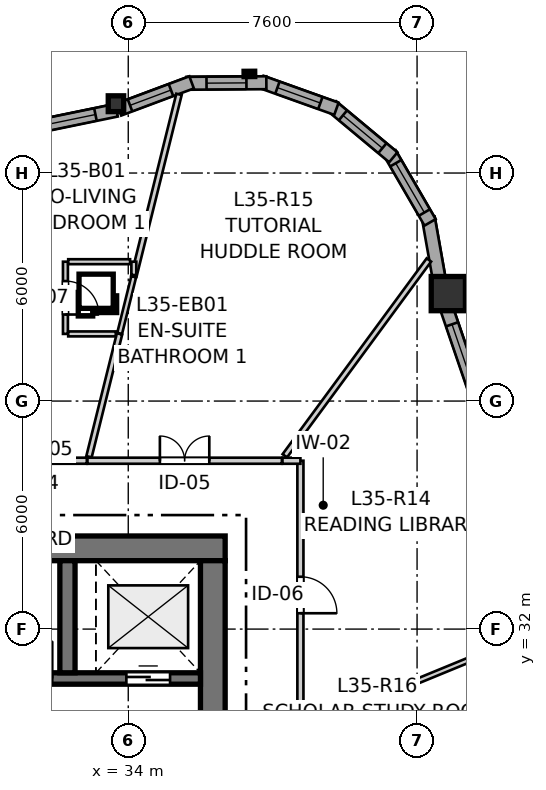
"""IFC4 building model, lengths in metres.
Left out: names, types, materials, properties, quantities, classifications, styles, units other than length and angle.
Written with IfcOpenShell. Run it as: python <this file> out.ifc"""

import sys

from ifc_helpers import new_model, si_unit, direction, frame, frame_2d, origin, origin_2d, place, context, subcontext, project, spatial, rectangle, i_section, extrude, source, transform, mapped, element, fill, save


model = new_model("IFC4")
c1 = context("Model", 3, precision=1e-05, world=origin(), true_north=direction((0.0, 1.0)))
c2 = subcontext(c1, "Body", "Model", "MODEL_VIEW")
j1 = project(units=[si_unit("LENGTHUNIT", "METRE"), si_unit("PLANEANGLEUNIT", "RADIAN")], contexts=[c1])
p1 = place(None, origin())
s1 = spatial("IfcSite", under=j1, at=p1, CompositionType="ELEMENT")
p2 = place(p1, origin())
s2 = spatial("IfcBuilding", under=s1, at=p2, CompositionType="ELEMENT")
p3 = place(p2, frame((0.0, 0.0, 118.4)))
s3 = spatial("IfcBuildingStorey", under=s2, at=p3, CompositionType="ELEMENT", Elevation=118.4)
p4 = place(p3, frame((36.55, 34.125, 0.0), z_axis=(0.0, 0.0, 1.0), x_axis=(-1.0, 0.0, 0.0)))
e1 = element("IfcWall", 1, at=p4, inside=s3, PredefinedType="SHEAR", context=c2, shape_type="SweptSolid", body=[
    extrude(rectangle(XDim=12.4, YDim=0.65, at=frame_2d((6.2, 0.0))), origin(), (0.0, 0.0, 1.0), 2.95),
])
p5 = place(p3, frame((36.225, 18.2, 0.0), z_axis=(0.0, 0.0, 1.0), x_axis=(0.0, 1.0, 0.0)))
e2 = element("IfcWall", 2, at=p5, inside=s3, PredefinedType="SHEAR", context=c2, shape_type="SweptSolid", body=[
    extrude(rectangle(XDim=15.6, YDim=0.65, at=frame_2d((7.8, 0.0))), origin(), (0.0, 0.0, 1.0), 2.95),
])
p6 = place(p5, frame((4.25, 0.0, 0.0)))
e3 = element("IfcOpeningElement", 3, at=p6, cuts=e2, PredefinedType="OPENING", context=c2, shape_type="SweptSolid", body=[
    extrude(rectangle(XDim=1.1, YDim=2.15, at=frame_2d((0.55, 1.075))), frame((0.0, 0.335, 0.0), z_axis=(0.0, -1.0, 0.0), x_axis=(1.0, 0.0, 0.0)), (0.0, 0.0, 1.0), 0.67),
])
p7 = place(p5, frame((10.25, 0.0, 0.0)))
e4 = element("IfcOpeningElement", 4, at=p7, cuts=e2, PredefinedType="OPENING", context=c2, shape_type="SweptSolid", body=[
    extrude(rectangle(XDim=1.1, YDim=2.15, at=frame_2d((0.55, 1.075))), frame((0.0, 0.335, 0.0), z_axis=(0.0, -1.0, 0.0), x_axis=(1.0, 0.0, 0.0)), (0.0, 0.0, 1.0), 0.67),
])
p8 = place(p3, frame((24.8, 30.7, 0.0), z_axis=(0.0, 0.0, 1.0), x_axis=(1.0, 0.0, 0.0)))
e5 = element("IfcWall", 5, at=p8, inside=s3, PredefinedType="SHEAR", context=c2, shape_type="SweptSolid", body=[
    extrude(rectangle(XDim=11.1, YDim=0.3, at=frame_2d((5.55, 0.0))), origin(), (0.0, 0.0, 1.0), 2.95),
])
p9 = place(p8, frame((6.22, 0.0, 0.0)))
e6 = element("IfcOpeningElement", 6, at=p9, cuts=e5, PredefinedType="OPENING", context=c2, shape_type="SweptSolid", body=[
    extrude(rectangle(XDim=0.98, YDim=2.15, at=frame_2d((0.49, 1.075))), frame((0.0, 0.16, 0.0), z_axis=(0.0, -1.0, 0.0), x_axis=(1.0, 0.0, 0.0)), (0.0, 0.0, 1.0), 0.32),
])
p10 = place(p8, frame((9.15, 0.0, 0.0)))
e7 = element("IfcOpeningElement", 7, at=p10, cuts=e5, PredefinedType="OPENING", context=c2, shape_type="SweptSolid", body=[
    extrude(rectangle(XDim=1.15, YDim=2.15, at=frame_2d((0.575, 1.075))), frame((0.0, 0.16, 0.0), z_axis=(0.0, -1.0, 0.0), x_axis=(1.0, 0.0, 0.0)), (0.0, 0.0, 1.0), 0.32),
])
p11 = place(p3, frame((32.4, 30.85, 0.0), z_axis=(0.0, 0.0, 1.0), x_axis=(0.0, 1.0, 0.0)))
e8 = element("IfcWall", 8, at=p11, inside=s3, PredefinedType="SHEAR", context=c2, shape_type="SweptSolid", body=[
    extrude(rectangle(XDim=2.95, YDim=0.4, at=frame_2d((1.475, 0.0))), origin(), (0.0, 0.0, 1.0), 2.95),
])
m1 = source(origin(), c2, "Body", "SweptSolid", [
    extrude(rectangle(XDim=0.9, YDim=0.9, at=origin_2d()), origin(), (0.0, 0.0, 1.0), 2.95),
])
p12 = place(p3, frame((42.423, 40.828, 0.0), z_axis=(0.0, 0.0, 1.0), x_axis=(1.0, 0.0, 0.0)))
e9 = element("IfcColumn", 9, at=p12, inside=s3, PredefinedType="COLUMN", context=c2, shape_type="MappedRepresentation", body=[
    mapped(m1, transform((0.0, 0.0, 0.0), x_axis=(1.0, 0.0, 0.0), y_axis=(0.0, 1.0, 0.0), z_axis=(0.0, 0.0, 1.0), scale=1.0)),
])
m2 = source(origin(), c2, "Body", "SweptSolid", [
    extrude(i_section(OverallWidth=0.406, OverallDepth=0.416, WebThickness=0.027, FlangeThickness=0.044, FilletRadius=0.015, at=origin_2d()), origin(), (0.0, 0.0, 1.0), 2.95),
])
p13 = place(p3, frame((33.677, 45.824, 0.0), z_axis=(0.0, 0.0, 1.0), x_axis=(1.0, 0.0, 0.0)))
e10 = element("IfcColumn", 10, at=p13, inside=s3, PredefinedType="PILASTER", context=c2, shape_type="MappedRepresentation", body=[
    mapped(m2, transform((0.0, 0.0, 0.0), x_axis=(1.0, 0.0, 0.0), y_axis=(0.0, 1.0, 0.0), z_axis=(0.0, 0.0, 1.0), scale=1.0)),
])
p14 = place(p3, frame((43.288, 37.771, 0.0), z_axis=(0.0, 0.0, 1.0), x_axis=(-0.323537149191, 0.94621546864, 0.0)))
e11 = element("IfcWall", 11, at=p14, inside=s3, PredefinedType="SOLIDWALL", context=c2, shape_type="SweptSolid", body=[
    extrude(rectangle(XDim=2.942, YDim=0.34, at=frame_2d((1.471, 0.0))), origin(), (0.0, 0.0, 1.0), 2.48),
])
p15 = place(p14, frame((0.576, 0.0, 0.82)))
e12 = element("IfcOpeningElement", 12, at=p15, cuts=e11, PredefinedType="OPENING", context=c2, shape_type="SweptSolid", body=[
    extrude(rectangle(XDim=1.8, YDim=1.45, at=frame_2d((0.9, 0.725))), frame((0.0, 0.18, 0.0), z_axis=(0.0, -1.0, 0.0), x_axis=(1.0, 0.0, 0.0)), (0.0, 0.0, 1.0), 0.36),
])
p16 = place(p3, frame((42.215, 41.024, 0.0), z_axis=(0.0, 0.0, 1.0), x_axis=(-0.17440141227, 0.984674640375, 0.0)))
e13 = element("IfcWall", 13, at=p16, inside=s3, PredefinedType="SOLIDWALL", context=c2, shape_type="SweptSolid", body=[
    extrude(rectangle(XDim=1.831, YDim=0.34, at=frame_2d((0.916, 0.0))), origin(), (0.0, 0.0, 1.0), 2.48),
])
p17 = place(p3, frame((41.942, 42.701, 0.0), z_axis=(0.0, 0.0, 1.0), x_axis=(-0.501902596059, 0.864924149315, 0.0)))
e14 = element("IfcWall", 14, at=p17, inside=s3, PredefinedType="SOLIDWALL", context=c2, shape_type="SweptSolid", body=[
    extrude(rectangle(XDim=2.099, YDim=0.34, at=frame_2d((1.049, 0.0))), origin(), (0.0, 0.0, 1.0), 2.48),
])
p18 = place(p17, frame((0.3, 0.0, 0.82)))
e15 = element("IfcOpeningElement", 15, at=p18, cuts=e14, PredefinedType="OPENING", context=c2, shape_type="SweptSolid", body=[
    extrude(rectangle(XDim=1.5, YDim=1.45, at=frame_2d((0.75, 0.725))), frame((0.0, 0.18, 0.0), z_axis=(0.0, -1.0, 0.0), x_axis=(1.0, 0.0, 0.0)), (0.0, 0.0, 1.0), 0.36),
])
p19 = place(p3, frame((40.975, 44.414, 0.0), z_axis=(0.0, 0.0, 1.0), x_axis=(-0.768440501876, 0.639921241308, 0.0)))
e16 = element("IfcWall", 16, at=p19, inside=s3, PredefinedType="SOLIDWALL", context=c2, shape_type="SweptSolid", body=[
    extrude(rectangle(XDim=2.099, YDim=0.34, at=frame_2d((1.05, 0.0))), origin(), (0.0, 0.0, 1.0), 2.48),
])
p20 = place(p19, frame((0.375, 0.0, 0.82)))
e17 = element("IfcOpeningElement", 17, at=p20, cuts=e16, PredefinedType="OPENING", context=c2, shape_type="SweptSolid", body=[
    extrude(rectangle(XDim=1.35, YDim=1.45, at=frame_2d((0.675, 0.725))), frame((0.0, 0.18, 0.0), z_axis=(0.0, -1.0, 0.0), x_axis=(1.0, 0.0, 0.0)), (0.0, 0.0, 1.0), 0.36),
])
p21 = place(p3, frame((39.478, 45.691, 0.0), z_axis=(0.0, 0.0, 1.0), x_axis=(-0.941523304278, 0.336947870598, 0.0)))
e18 = element("IfcWall", 18, at=p21, inside=s3, PredefinedType="SOLIDWALL", context=c2, shape_type="SweptSolid", body=[
    extrude(rectangle(XDim=2.099, YDim=0.34, at=frame_2d((1.05, 0.0))), origin(), (0.0, 0.0, 1.0), 2.48),
])
p22 = place(p21, frame((0.449, 0.0, 0.82)))
e19 = element("IfcOpeningElement", 19, at=p22, cuts=e18, PredefinedType="OPENING", context=c2, shape_type="SweptSolid", body=[
    extrude(rectangle(XDim=1.2, YDim=1.45, at=frame_2d((0.6, 0.725))), frame((0.0, 0.18, 0.0), z_axis=(0.0, -1.0, 0.0), x_axis=(1.0, 0.0, 0.0)), (0.0, 0.0, 1.0), 0.36),
])
p23 = place(p3, frame((37.634, 46.376, 0.0), z_axis=(0.0, 0.0, 1.0), x_axis=(-0.999976456891, -0.00686189939, 0.0)))
e20 = element("IfcWall", 20, at=p23, inside=s3, PredefinedType="SOLIDWALL", context=c2, shape_type="SweptSolid", body=[
    extrude(rectangle(XDim=2.099, YDim=0.34, at=frame_2d((1.05, 0.0))), origin(), (0.0, 0.0, 1.0), 2.48),
])
p24 = place(p23, frame((0.524, 0.0, 0.82)))
e21 = element("IfcOpeningElement", 21, at=p24, cuts=e20, PredefinedType="OPENING", context=c2, shape_type="SweptSolid", body=[
    extrude(rectangle(XDim=1.05, YDim=1.45, at=frame_2d((0.525, 0.725))), frame((0.0, 0.18, 0.0), z_axis=(0.0, -1.0, 0.0), x_axis=(1.0, 0.0, 0.0)), (0.0, 0.0, 1.0), 0.36),
])
p25 = place(p3, frame((35.667, 46.386, 0.0), z_axis=(0.0, 0.0, 1.0), x_axis=(-0.936761017964, -0.34996970615, 0.0)))
e22 = element("IfcWall", 22, at=p25, inside=s3, PredefinedType="SOLIDWALL", context=c2, shape_type="SweptSolid", body=[
    extrude(rectangle(XDim=2.041, YDim=0.34, at=frame_2d((1.021, 0.0))), origin(), (0.0, 0.0, 1.0), 2.48),
])
p26 = place(p25, frame((0.579, 0.0, 0.82)))
e23 = element("IfcOpeningElement", 23, at=p26, cuts=e22, PredefinedType="OPENING", context=c2, shape_type="SweptSolid", body=[
    extrude(rectangle(XDim=1.15, YDim=1.2, at=frame_2d((0.575, 0.6))), frame((0.0, 0.18, 0.0), z_axis=(0.0, -1.0, 0.0), x_axis=(1.0, 0.0, 0.0)), (0.0, 0.0, 1.0), 0.36),
])
p27 = place(p3, frame((33.691, 45.653, 0.0), z_axis=(0.0, 0.0, 1.0), x_axis=(-0.979414063846, -0.201861565287, 0.0)))
e24 = element("IfcWall", 24, at=p27, inside=s3, PredefinedType="SOLIDWALL", context=c2, shape_type="SweptSolid", body=[
    extrude(rectangle(XDim=3.104, YDim=0.34, at=frame_2d((1.552, 0.0))), origin(), (0.0, 0.0, 1.0), 2.48),
])
p28 = place(p27, frame((0.567, 0.0, 0.82)))
e25 = element("IfcOpeningElement", 25, at=p28, cuts=e24, PredefinedType="OPENING", context=c2, shape_type="SweptSolid", body=[
    extrude(rectangle(XDim=1.95, YDim=1.4, at=frame_2d((0.975, 0.7))), frame((0.0, 0.18, 0.0), z_axis=(0.0, -1.0, 0.0), x_axis=(1.0, 0.0, 0.0)), (0.0, 0.0, 1.0), 0.36),
])
p29 = place(p3, frame((38.53, 36.43, 0.0), z_axis=(0.0, 0.0, 1.0), x_axis=(0.0, -1.0, 0.0)))
e26 = element("IfcWall", 26, at=p29, inside=s3, PredefinedType="PARTITIONING", context=c2, shape_type="SweptSolid", body=[
    extrude(rectangle(XDim=7.083, YDim=0.16, at=frame_2d((3.542, 0.0))), origin(), (0.0, 0.0, 1.0), 2.588),
])
p30 = place(p29, frame((3.053, 0.0, 0.0)))
e27 = element("IfcOpeningElement", 27, at=p30, cuts=e26, PredefinedType="OPENING", context=c2, shape_type="SweptSolid", body=[
    extrude(rectangle(XDim=0.96, YDim=2.1, at=frame_2d((0.48, 1.05))), frame((0.0, 0.09, 0.0), z_axis=(0.0, -1.0, 0.0), x_axis=(1.0, 0.0, 0.0)), (0.0, 0.0, 1.0), 0.18),
])
p31 = place(p3, frame((32.925, 36.43, 0.0), z_axis=(0.0, 0.0, 1.0), x_axis=(1.0, 0.0, 0.0)))
e28 = element("IfcWall", 28, at=p31, inside=s3, PredefinedType="PARTITIONING", context=c2, shape_type="SweptSolid", body=[
    extrude(rectangle(XDim=5.118, YDim=0.16, at=frame_2d((2.559, 0.0))), origin(), (0.0, 0.0, 1.0), 2.588),
])
p32 = place(p31, frame((1.907, 0.0, 0.0)))
e29 = element("IfcOpeningElement", 29, at=p32, cuts=e28, PredefinedType="OPENING", context=c2, shape_type="SweptSolid", body=[
    extrude(rectangle(XDim=1.3, YDim=2.1, at=frame_2d((0.65, 1.05))), frame((0.0, 0.09, 0.0), z_axis=(0.0, -1.0, 0.0), x_axis=(1.0, 0.0, 0.0)), (0.0, 0.0, 1.0), 0.18),
])
p33 = place(p3, frame((30.063, 36.43, 0.0), z_axis=(0.0, 0.0, 1.0), x_axis=(1.0, 0.0, 0.0)))
e30 = element("IfcWall", 30, at=p33, inside=s3, PredefinedType="PARTITIONING", context=c2, shape_type="SweptSolid", body=[
    extrude(rectangle(XDim=2.847, YDim=0.16, at=frame_2d((1.423, 0.0))), origin(), (0.0, 0.0, 1.0), 2.95),
])
p34 = place(p33, frame((0.964, 0.0, 0.0)))
e31 = element("IfcOpeningElement", 31, at=p34, cuts=e30, PredefinedType="OPENING", context=c2, shape_type="SweptSolid", body=[
    extrude(rectangle(XDim=0.92, YDim=2.1, at=frame_2d((0.46, 1.05))), frame((0.0, 0.09, 0.0), z_axis=(0.0, -1.0, 0.0), x_axis=(1.0, 0.0, 0.0)), (0.0, 0.0, 1.0), 0.18),
])
p35 = place(p3, frame((32.347, 41.667, 0.0), z_axis=(0.0, 0.0, 1.0), x_axis=(0.0, -1.0, 0.0)))
e32 = element("IfcWall", 32, at=p35, inside=s3, PredefinedType="PARTITIONING", context=c2, shape_type="SweptSolid", body=[
    extrude(rectangle(XDim=1.9, YDim=0.13, at=frame_2d((0.95, 0.0))), origin(), (0.0, 0.0, 1.0), 2.95),
])
p36 = place(p35, frame((0.51, 0.0, 0.0)))
e33 = element("IfcOpeningElement", 33, at=p36, cuts=e32, PredefinedType="OPENING", context=c2, shape_type="SweptSolid", body=[
    extrude(rectangle(XDim=0.88, YDim=2.05, at=frame_2d((0.44, 1.025))), frame((0.0, 0.075, 0.0), z_axis=(0.0, -1.0, 0.0), x_axis=(1.0, 0.0, 0.0)), (0.0, 0.0, 1.0), 0.15),
])
p37 = place(p3, frame((38.119, 36.559, 0.0), z_axis=(0.0, 0.0, 1.0), x_axis=(0.592704345809, 0.805420113021, 0.0)))
e34 = element("IfcWall", 34, at=p37, inside=s3, PredefinedType="PARTITIONING", context=c2, shape_type="SweptSolid", body=[
    extrude(rectangle(XDim=6.399, YDim=0.145, at=frame_2d((3.199, 0.0))), origin(), (0.0, 0.0, 1.0), 2.95),
])
p38 = place(p3, frame((38.642, 29.41, 0.0), z_axis=(0.0, 0.0, 1.0), x_axis=(0.924865201518, 0.380295094659, 0.0)))
e35 = element("IfcWall", 35, at=p38, inside=s3, PredefinedType="PARTITIONING", context=c2, shape_type="SweptSolid", body=[
    extrude(rectangle(XDim=6.266, YDim=0.13, at=frame_2d((3.133, 0.0))), origin(), (0.0, 0.0, 1.0), 2.95),
])
p39 = place(p3, frame((34.147, 41.286, 0.0), z_axis=(0.0, 0.0, 1.0), x_axis=(0.241055314039, 0.970511378384, 0.0)))
e36 = element("IfcWall", 36, at=p39, inside=s3, PredefinedType="PARTITIONING", context=c2, shape_type="SweptSolid", body=[
    extrude(rectangle(XDim=4.929, YDim=0.145, at=frame_2d((2.465, 0.0))), origin(), (0.0, 0.0, 1.0), 2.95),
])
p40 = place(p3, frame((32.967, 36.535, 0.0), z_axis=(0.0, 0.0, 1.0), x_axis=(0.241120890255, 0.970495088232, 0.0)))
e37 = element("IfcWall", 37, at=p40, inside=s3, PredefinedType="PARTITIONING", context=c2, shape_type="SweptSolid", body=[
    extrude(rectangle(XDim=3.33, YDim=0.145, at=frame_2d((1.665, 0.0))), origin(), (0.0, 0.0, 1.0), 2.95),
])
p41 = place(p3, frame((32.42, 41.667, 0.0), z_axis=(0.0, 0.0, 1.0), x_axis=(1.0, 0.0, 0.0)))
e38 = element("IfcWall", 38, at=p41, inside=s3, PredefinedType="PARTITIONING", context=c2, shape_type="SweptSolid", body=[
    extrude(rectangle(XDim=1.628, YDim=0.13, at=frame_2d((0.814, 0.0))), origin(), (0.0, 0.0, 1.0), 2.95),
])
p42 = place(p3, frame((33.774, 39.781, 0.0), z_axis=(0.0, 0.0, 1.0), x_axis=(0.240776504653, 0.970580586457, 0.0)))
e39 = element("IfcWall", 39, at=p42, inside=s3, PredefinedType="PARTITIONING", context=c2, shape_type="SweptSolid", body=[
    extrude(rectangle(XDim=1.535, YDim=0.13, at=frame_2d((0.768, 0.0))), origin(), (0.0, 0.0, 1.0), 2.95),
])
p43 = place(p3, frame((32.42, 39.767, 0.0), z_axis=(0.0, 0.0, 1.0), x_axis=(1.0, 0.0, 0.0)))
e40 = element("IfcWall", 40, at=p43, inside=s3, PredefinedType="PARTITIONING", context=c2, shape_type="SweptSolid", body=[
    extrude(rectangle(XDim=1.251, YDim=0.13, at=frame_2d((0.625, 0.0))), origin(), (0.0, 0.0, 1.0), 2.95),
])
p44 = place(p3, frame((38.058, 36.43, 0.0), z_axis=(0.0, 0.0, 1.0), x_axis=(1.0, 0.0, 0.0)))
e41 = element("IfcWall", 41, at=p44, inside=s3, PredefinedType="PARTITIONING", context=c2, shape_type="SweptSolid", body=[
    extrude(rectangle(XDim=0.472, YDim=0.16, at=frame_2d((0.236, 0.0))), origin(), (0.0, 0.0, 1.0), 2.588),
])
p45 = place(p3, frame((34.147, 41.317, 0.0), z_axis=(0.0, 0.0, 1.0), x_axis=(0.0, 1.0, 0.0)))
e42 = element("IfcWall", 42, at=p45, inside=s3, PredefinedType="PARTITIONING", context=c2, shape_type="SweptSolid", body=[
    extrude(rectangle(XDim=0.35, YDim=0.13, at=frame_2d((0.175, 0.0))), origin(), (0.0, 0.0, 1.0), 2.95),
])
m3 = source(origin(), c2, "Body", "SweptSolid", [
    extrude(rectangle(XDim=1.8, YDim=1.45, at=frame_2d((0.9, 0.725))), frame((0.0, 0.03, 0.0), z_axis=(0.0, -1.0, 0.0), x_axis=(1.0, 0.0, 0.0)), (0.0, 0.0, 1.0), 0.06),
])
p46 = place(p15, origin())
e43 = element("IfcWindow", 43, at=p46, inside=s3, PartitioningType="SINGLE_PANEL", PredefinedType="WINDOW", context=c2, shape_type="MappedRepresentation", body=[
    mapped(m3, transform((0.0, 0.0, 0.0), x_axis=(1.0, 0.0, 0.0), y_axis=(0.0, 1.0, 0.0), z_axis=(0.0, 0.0, 1.0), scale=1.0)),
])
fill(e12, e43)
m4 = source(origin(), c2, "Body", "SweptSolid", [
    extrude(rectangle(XDim=1.5, YDim=1.45, at=frame_2d((0.75, 0.725))), frame((0.0, 0.03, 0.0), z_axis=(0.0, -1.0, 0.0), x_axis=(1.0, 0.0, 0.0)), (0.0, 0.0, 1.0), 0.06),
])
p47 = place(p18, origin())
e44 = element("IfcWindow", 44, at=p47, inside=s3, PartitioningType="SINGLE_PANEL", PredefinedType="WINDOW", context=c2, shape_type="MappedRepresentation", body=[
    mapped(m4, transform((0.0, 0.0, 0.0), x_axis=(1.0, 0.0, 0.0), y_axis=(0.0, 1.0, 0.0), z_axis=(0.0, 0.0, 1.0), scale=1.0)),
])
fill(e15, e44)
m5 = source(origin(), c2, "Body", "SweptSolid", [
    extrude(rectangle(XDim=1.35, YDim=1.45, at=frame_2d((0.675, 0.725))), frame((0.0, 0.03, 0.0), z_axis=(0.0, -1.0, 0.0), x_axis=(1.0, 0.0, 0.0)), (0.0, 0.0, 1.0), 0.06),
])
p48 = place(p20, origin())
e45 = element("IfcWindow", 45, at=p48, inside=s3, PartitioningType="SINGLE_PANEL", PredefinedType="WINDOW", context=c2, shape_type="MappedRepresentation", body=[
    mapped(m5, transform((0.0, 0.0, 0.0), x_axis=(1.0, 0.0, 0.0), y_axis=(0.0, 1.0, 0.0), z_axis=(0.0, 0.0, 1.0), scale=1.0)),
])
fill(e17, e45)
m6 = source(origin(), c2, "Body", "SweptSolid", [
    extrude(rectangle(XDim=1.2, YDim=1.45, at=frame_2d((0.6, 0.725))), frame((0.0, 0.03, 0.0), z_axis=(0.0, -1.0, 0.0), x_axis=(1.0, 0.0, 0.0)), (0.0, 0.0, 1.0), 0.06),
])
p49 = place(p22, origin())
e46 = element("IfcWindow", 46, at=p49, inside=s3, PartitioningType="SINGLE_PANEL", PredefinedType="WINDOW", context=c2, shape_type="MappedRepresentation", body=[
    mapped(m6, transform((0.0, 0.0, 0.0), x_axis=(1.0, 0.0, 0.0), y_axis=(0.0, 1.0, 0.0), z_axis=(0.0, 0.0, 1.0), scale=1.0)),
])
fill(e19, e46)
m7 = source(origin(), c2, "Body", "SweptSolid", [
    extrude(rectangle(XDim=1.05, YDim=1.45, at=frame_2d((0.525, 0.725))), frame((0.0, 0.03, 0.0), z_axis=(0.0, -1.0, 0.0), x_axis=(1.0, 0.0, 0.0)), (0.0, 0.0, 1.0), 0.06),
])
p50 = place(p24, origin())
e47 = element("IfcWindow", 47, at=p50, inside=s3, PartitioningType="SINGLE_PANEL", PredefinedType="WINDOW", context=c2, shape_type="MappedRepresentation", body=[
    mapped(m7, transform((0.0, 0.0, 0.0), x_axis=(1.0, 0.0, 0.0), y_axis=(0.0, 1.0, 0.0), z_axis=(0.0, 0.0, 1.0), scale=1.0)),
])
fill(e21, e47)
m8 = source(origin(), c2, "Body", "SweptSolid", [
    extrude(rectangle(XDim=1.15, YDim=1.2, at=frame_2d((0.575, 0.6))), frame((0.0, 0.03, 0.0), z_axis=(0.0, -1.0, 0.0), x_axis=(1.0, 0.0, 0.0)), (0.0, 0.0, 1.0), 0.06),
])
p51 = place(p26, origin())
e48 = element("IfcWindow", 48, at=p51, inside=s3, PartitioningType="SINGLE_PANEL", PredefinedType="WINDOW", context=c2, shape_type="MappedRepresentation", body=[
    mapped(m8, transform((0.0, 0.0, 0.0), x_axis=(1.0, 0.0, 0.0), y_axis=(0.0, 1.0, 0.0), z_axis=(0.0, 0.0, 1.0), scale=1.0)),
])
fill(e23, e48)
m9 = source(origin(), c2, "Body", "SweptSolid", [
    extrude(rectangle(XDim=1.95, YDim=1.4, at=frame_2d((0.975, 0.7))), frame((0.0, 0.03, 0.0), z_axis=(0.0, -1.0, 0.0), x_axis=(1.0, 0.0, 0.0)), (0.0, 0.0, 1.0), 0.06),
])
p52 = place(p28, origin())
e49 = element("IfcWindow", 49, at=p52, inside=s3, PartitioningType="SINGLE_PANEL", PredefinedType="WINDOW", context=c2, shape_type="MappedRepresentation", body=[
    mapped(m9, transform((0.0, 0.0, 0.0), x_axis=(1.0, 0.0, 0.0), y_axis=(0.0, 1.0, 0.0), z_axis=(0.0, 0.0, 1.0), scale=1.0)),
])
fill(e25, e49)
m10 = source(origin(), c2, "Body", "SweptSolid", [
    extrude(rectangle(XDim=0.98, YDim=2.15, at=frame_2d((0.49, 1.075))), frame((0.0, 0.025, 0.0), z_axis=(0.0, -1.0, 0.0), x_axis=(1.0, 0.0, 0.0)), (0.0, 0.0, 1.0), 0.05),
])
p53 = place(p9, origin())
e50 = element("IfcDoor", 50, at=p53, inside=s3, OperationType="SINGLE_SWING_RIGHT", PredefinedType="DOOR", context=c2, shape_type="MappedRepresentation", body=[
    mapped(m10, transform((0.0, 0.0, 0.0), x_axis=(1.0, 0.0, 0.0), y_axis=(0.0, 1.0, 0.0), z_axis=(0.0, 0.0, 1.0), scale=1.0)),
])
fill(e6, e50)
m11 = source(origin(), c2, "Body", "SweptSolid", [
    extrude(rectangle(XDim=1.15, YDim=2.15, at=frame_2d((0.575, 1.075))), frame((0.0, 0.025, 0.0), z_axis=(0.0, -1.0, 0.0), x_axis=(1.0, 0.0, 0.0)), (0.0, 0.0, 1.0), 0.05),
])
p54 = place(p10, origin())
e51 = element("IfcDoor", 51, at=p54, inside=s3, OperationType="DOUBLE_DOOR_SLIDING", PredefinedType="DOOR", context=c2, shape_type="MappedRepresentation", body=[
    mapped(m11, transform((0.0, 0.0, 0.0), x_axis=(1.0, 0.0, 0.0), y_axis=(0.0, 1.0, 0.0), z_axis=(0.0, 0.0, 1.0), scale=1.0)),
])
fill(e7, e51)
m12 = source(origin(), c2, "Body", "SweptSolid", [
    extrude(rectangle(XDim=0.96, YDim=2.1, at=frame_2d((0.48, 1.05))), frame((0.0, 0.025, 0.0), z_axis=(0.0, -1.0, 0.0), x_axis=(1.0, 0.0, 0.0)), (0.0, 0.0, 1.0), 0.05),
])
p55 = place(p30, origin())
e52 = element("IfcDoor", 52, at=p55, inside=s3, OperationType="SINGLE_SWING_RIGHT", PredefinedType="DOOR", context=c2, shape_type="MappedRepresentation", body=[
    mapped(m12, transform((0.0, 0.0, 0.0), x_axis=(1.0, 0.0, 0.0), y_axis=(0.0, 1.0, 0.0), z_axis=(0.0, 0.0, 1.0), scale=1.0)),
])
fill(e27, e52)
m13 = source(origin(), c2, "Body", "SweptSolid", [
    extrude(rectangle(XDim=1.3, YDim=2.1, at=frame_2d((0.65, 1.05))), frame((0.0, 0.025, 0.0), z_axis=(0.0, -1.0, 0.0), x_axis=(1.0, 0.0, 0.0)), (0.0, 0.0, 1.0), 0.05),
])
p56 = place(p32, origin())
e53 = element("IfcDoor", 53, at=p56, inside=s3, OperationType="DOUBLE_DOOR_SINGLE_SWING", PredefinedType="DOOR", context=c2, shape_type="MappedRepresentation", body=[
    mapped(m13, transform((0.0, 0.0, 0.0), x_axis=(1.0, 0.0, 0.0), y_axis=(0.0, 1.0, 0.0), z_axis=(0.0, 0.0, 1.0), scale=1.0)),
])
fill(e29, e53)
m14 = source(origin(), c2, "Body", "SweptSolid", [
    extrude(rectangle(XDim=0.88, YDim=2.05, at=frame_2d((0.44, 1.025))), frame((0.0, 0.025, 0.0), z_axis=(0.0, -1.0, 0.0), x_axis=(1.0, 0.0, 0.0)), (0.0, 0.0, 1.0), 0.05),
])
p57 = place(p36, origin())
e54 = element("IfcDoor", 54, at=p57, inside=s3, OperationType="SINGLE_SWING_RIGHT", PredefinedType="DOOR", context=c2, shape_type="MappedRepresentation", body=[
    mapped(m14, transform((0.0, 0.0, 0.0), x_axis=(1.0, 0.0, 0.0), y_axis=(0.0, 1.0, 0.0), z_axis=(0.0, 0.0, 1.0), scale=1.0)),
])
fill(e33, e54)
save(model, sys.argv[1])
